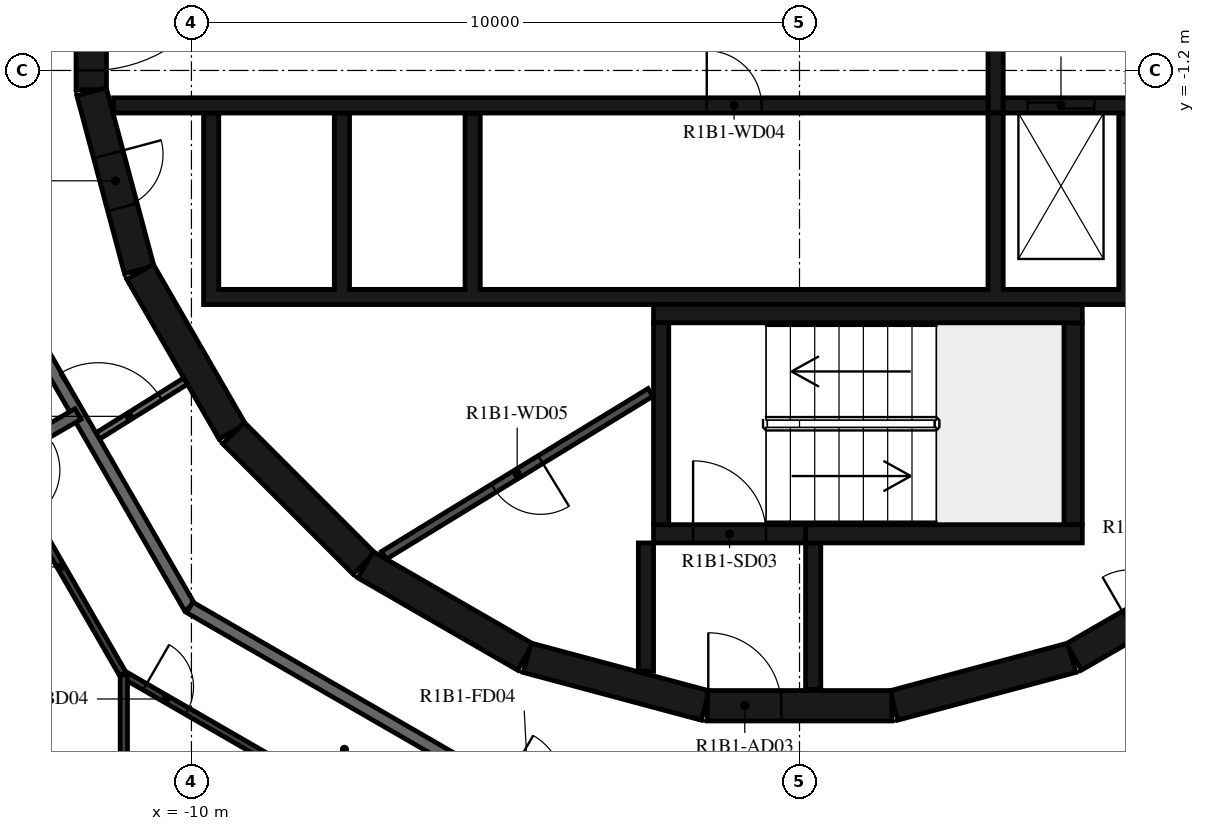
"""IFC4 building model, lengths in metres.
Left out: names, types, materials, properties, quantities, classifications, styles, units other than length and angle.
Written with IfcOpenShell. Run it as: python <this file> out.ifc"""

import sys

from ifc_helpers import new_model, si_unit, direction, frame, frame_2d, origin, place, context, subcontext, project, spatial, polyline, rectangle, outline, extrude, element, fill, save


model = new_model("IFC4")
c1 = context("Model", 3, precision=1e-05, world=origin(), true_north=direction((0.0, 1.0)))
c2 = subcontext(c1, "Body", "Model", "MODEL_VIEW")
j1 = project(units=[si_unit("LENGTHUNIT", "METRE"), si_unit("PLANEANGLEUNIT", "RADIAN")], contexts=[c1])
p1 = place(None, origin())
s1 = spatial("IfcSite", under=j1, at=p1, CompositionType="ELEMENT")
p2 = place(p1, origin())
s2 = spatial("IfcBuilding", under=s1, at=p2, CompositionType="ELEMENT")
p3 = place(p2, frame((0.0, 0.0, 48.9)))
s3 = spatial("IfcBuildingStorey", under=s2, at=p3, CompositionType="ELEMENT", Elevation=48.9)
p4 = place(p3, frame((1.55, -11.643, 0.0), z_axis=(0.0, 0.0, 1.0), x_axis=(0.965948410781, 0.258734743916, 0.0)))
e1 = element("IfcWall", 1, at=p4, inside=s3, PredefinedType="SHEAR", context=c2, shape_type="SweptSolid", body=[
    extrude(rectangle(XDim=3.033, YDim=0.5, at=frame_2d((1.516, 0.0))), origin(), (0.0, 0.0, 1.0), 3.12),
])
p5 = place(p3, frame((4.51, -10.845, 0.0), z_axis=(0.0, 0.0, 1.0), x_axis=(0.865975092491, 0.500087131594, 0.0)))
e2 = element("IfcWall", 2, at=p5, inside=s3, PredefinedType="SHEAR", context=c2, shape_type="SweptSolid", body=[
    extrude(rectangle(XDim=3.033, YDim=0.5, at=frame_2d((1.516, 0.0))), origin(), (0.0, 0.0, 1.0), 3.12),
])
p6 = place(p5, frame((1.066, 0.0, 0.0)))
e3 = element("IfcOpeningElement", 3, at=p6, cuts=e2, PredefinedType="OPENING", context=c2, shape_type="SweptSolid", body=[
    extrude(rectangle(XDim=0.9, YDim=2.1, at=frame_2d((0.45, 1.05))), frame((0.0, 0.26, 0.0), z_axis=(0.0, -1.0, 0.0), x_axis=(1.0, 0.0, 0.0)), (0.0, 0.0, 1.0), 0.52),
])
p7 = place(p3, frame((-11.647, 1.516, 0.0), z_axis=(0.0, 0.0, 1.0), x_axis=(0.0, -1.0, 0.0)))
e4 = element("IfcWall", 4, at=p7, inside=s3, PredefinedType="SHEAR", context=c2, shape_type="SweptSolid", body=[
    extrude(rectangle(XDim=3.033, YDim=0.5, at=frame_2d((1.516, 0.0))), origin(), (0.0, 0.0, 1.0), 3.12),
])
p8 = place(p7, frame((0.316, 0.0, 0.0)))
e5 = element("IfcOpeningElement", 5, at=p8, cuts=e4, PredefinedType="OPENING", context=c2, shape_type="SweptSolid", body=[
    extrude(rectangle(XDim=2.4, YDim=2.1, at=frame_2d((1.2, 1.05))), frame((0.0, 0.26, 0.0), z_axis=(0.0, -1.0, 0.0), x_axis=(1.0, 0.0, 0.0)), (0.0, 0.0, 1.0), 0.52),
])
p9 = place(p3, frame((-11.643, -1.55, 0.0), z_axis=(0.0, 0.0, 1.0), x_axis=(0.258734743916, -0.965948410781, 0.0)))
e6 = element("IfcWall", 6, at=p9, inside=s3, PredefinedType="SHEAR", context=c2, shape_type="SweptSolid", body=[
    extrude(rectangle(XDim=3.033, YDim=0.5, at=frame_2d((1.516, 0.0))), origin(), (0.0, 0.0, 1.0), 3.12),
])
p10 = place(p9, frame((1.066, 0.0, 0.0)))
e7 = element("IfcOpeningElement", 7, at=p10, cuts=e6, PredefinedType="OPENING", context=c2, shape_type="SweptSolid", body=[
    extrude(rectangle(XDim=0.9, YDim=2.1, at=frame_2d((0.45, 1.05))), frame((0.0, 0.26, 0.0), z_axis=(0.0, -1.0, 0.0), x_axis=(1.0, 0.0, 0.0)), (0.0, 0.0, 1.0), 0.52),
])
p11 = place(p3, frame((-10.845, -4.51, 0.0), z_axis=(0.0, 0.0, 1.0), x_axis=(0.500087131594, -0.865975092491, 0.0)))
e8 = element("IfcWall", 8, at=p11, inside=s3, PredefinedType="SHEAR", context=c2, shape_type="SweptSolid", body=[
    extrude(rectangle(XDim=3.033, YDim=0.5, at=frame_2d((1.516, 0.0))), origin(), (0.0, 0.0, 1.0), 3.12),
])
p12 = place(p3, frame((-9.308, -7.164, 0.0), z_axis=(0.0, 0.0, 1.0), x_axis=(0.707106781187, -0.707106781187, 0.0)))
e9 = element("IfcWall", 9, at=p12, inside=s3, PredefinedType="SHEAR", context=c2, shape_type="SweptSolid", body=[
    extrude(rectangle(XDim=3.032, YDim=0.5, at=frame_2d((1.516, 0.0))), origin(), (0.0, 0.0, 1.0), 3.12),
])
for number, where, z_axis, x_axis in (
    (10, (-7.137, -9.329, 0.0), (0.0, 0.0, 1.0), (0.866, -0.5, 0.0)),
    (11, (-4.479, -10.858, 0.0), (0.0, 0.0, 1.0), (0.966, -0.259, 0.0)),
):
    element("IfcWall", number, at=place(p3, frame(where, z_axis=z_axis, x_axis=x_axis)), inside=s3, PredefinedType="SHEAR", context=c2, shape_type="SweptSolid", body=[
        extrude(rectangle(XDim=3.033, YDim=0.5, at=frame_2d((1.516, 0.0))), origin(), (0.0, 0.0, 1.0), 3.12),
    ])
p13 = place(p3, frame((-1.516, -11.647, 0.0), z_axis=(0.0, 0.0, 1.0), x_axis=(1.0, 0.0, 0.0)))
e12 = element("IfcWall", 12, at=p13, inside=s3, PredefinedType="SHEAR", context=c2, shape_type="SweptSolid", body=[
    extrude(rectangle(XDim=3.033, YDim=0.5, at=frame_2d((1.516, 0.0))), origin(), (0.0, 0.0, 1.0), 3.12),
])
p14 = place(p13, frame((0.016, 0.0, 0.0)))
e13 = element("IfcOpeningElement", 13, at=p14, cuts=e12, PredefinedType="OPENING", context=c2, shape_type="SweptSolid", body=[
    extrude(rectangle(XDim=1.2, YDim=2.1, at=frame_2d((0.6, 1.05))), frame((0.0, 0.26, 0.0), z_axis=(0.0, -1.0, 0.0), x_axis=(1.0, 0.0, 0.0)), (0.0, 0.0, 1.0), 0.52),
])
p15 = place(p3, frame((-2.275, -8.67, 0.0), z_axis=(0.0, 0.0, 1.0), x_axis=(0.0, 1.0, 0.0)))
e14 = element("IfcWall", 14, at=p15, inside=s3, PredefinedType="SHEAR", context=c2, shape_type="SweptSolid", body=[
    extrude(rectangle(XDim=3.32, YDim=0.25, at=frame_2d((1.66, 0.0))), origin(), (0.0, 0.0, 1.0), 3.12),
])
p16 = place(p3, frame((-2.4, -5.2, 0.0), z_axis=(0.0, 0.0, 1.0), x_axis=(1.0, 0.0, 0.0)))
e15 = element("IfcWall", 15, at=p16, inside=s3, PredefinedType="SHEAR", context=c2, shape_type="SweptSolid", body=[
    extrude(rectangle(XDim=7.05, YDim=0.3, at=frame_2d((3.525, 0.0))), origin(), (0.0, 0.0, 1.0), 3.12),
])
p17 = place(p3, frame((4.5, -8.67, 0.0), z_axis=(0.0, 0.0, 1.0), x_axis=(0.0, 1.0, 0.0)))
e16 = element("IfcWall", 16, at=p17, inside=s3, PredefinedType="SHEAR", context=c2, shape_type="SweptSolid", body=[
    extrude(rectangle(XDim=3.32, YDim=0.3, at=frame_2d((1.66, 0.0))), origin(), (0.0, 0.0, 1.0), 3.12),
])
p18 = place(p3, frame((0.1, -8.82, 0.0), z_axis=(0.0, 0.0, 1.0), x_axis=(1.0, 0.0, 0.0)))
e17 = element("IfcWall", 17, at=p18, inside=s3, PredefinedType="SHEAR", context=c2, shape_type="SweptSolid", body=[
    extrude(rectangle(XDim=4.55, YDim=0.3, at=frame_2d((2.275, 0.0))), origin(), (0.0, 0.0, 1.0), 3.12),
])
p19 = place(p3, frame((-2.4, -8.82, 0.0), z_axis=(0.0, 0.0, 1.0), x_axis=(1.0, 0.0, 0.0)))
e18 = element("IfcWall", 18, at=p19, inside=s3, PredefinedType="SHEAR", context=c2, shape_type="SweptSolid", body=[
    extrude(rectangle(XDim=2.5, YDim=0.3, at=frame_2d((1.25, 0.0))), origin(), (0.0, 0.0, 1.0), 3.12),
])
p20 = place(p19, frame((0.65, 0.0, 0.0)))
e19 = element("IfcOpeningElement", 19, at=p20, cuts=e18, PredefinedType="OPENING", context=c2, shape_type="SweptSolid", body=[
    extrude(rectangle(XDim=1.2, YDim=2.1, at=frame_2d((0.6, 1.05))), frame((0.0, 0.16, 0.0), z_axis=(0.0, -1.0, 0.0), x_axis=(1.0, 0.0, 0.0)), (0.0, 0.0, 1.0), 0.32),
])
p21 = place(p3, frame((-2.525, -8.97, 0.0), z_axis=(0.0, 0.0, 1.0), x_axis=(0.0, -1.0, 0.0)))
e20 = element("IfcWall", 20, at=p21, inside=s3, PredefinedType="SHEAR", context=c2, shape_type="SweptSolid", body=[
    extrude(rectangle(XDim=2.11, YDim=0.25, at=frame_2d((1.055, 0.0))), origin(), (0.0, 0.0, 1.0), 3.12),
])
p22 = place(p3, frame((0.225, -8.97, 0.0), z_axis=(0.0, 0.0, 1.0), x_axis=(0.0, -1.0, 0.0)))
e21 = element("IfcWall", 21, at=p22, inside=s3, PredefinedType="SHEAR", context=c2, shape_type="SweptSolid", body=[
    extrude(rectangle(XDim=2.41, YDim=0.25, at=frame_2d((1.205, 0.0))), origin(), (0.0, 0.0, 1.0), 3.12),
])
p23 = place(p3, origin())
e22 = element("IfcWall", 22, at=p23, inside=s3, PredefinedType="SHEAR", context=c2, shape_type="SweptSolid", body=[
    extrude(outline(polyline([(9.8, -5.05), (9.8, -4.8), (9.8, -1.9), (9.55, -1.9), (9.55, -4.8), (7.65, -4.8), (7.65, -1.9), (7.4, -1.9), (7.4, -4.8), (5.5, -4.8), (5.5, -1.9), (5.25, -1.9), (5.25, -4.8), (3.35, -4.8), (3.35, -1.9), (3.1, -1.9), (3.1, -4.8), (-5.25, -4.8), (-5.25, -1.9), (-5.5, -1.9), (-5.5, -4.8), (-7.4, -4.8), (-7.4, -1.9), (-7.65, -1.9), (-7.65, -4.8), (-9.55, -4.8), (-9.55, -1.9), (-9.8, -1.9), (-9.8, -4.8), (-9.8, -5.05), (9.8, -5.05)])), origin(), (0.0, 0.0, 1.0), 3.12),
])
p24 = place(p3, frame((-11.28, -1.775, 0.0), z_axis=(0.0, 0.0, 1.0), x_axis=(1.0, 0.0, 0.0)))
e23 = element("IfcWall", 23, at=p24, inside=s3, PredefinedType="SHEAR", context=c2, shape_type="SweptSolid", body=[
    extrude(rectangle(XDim=14.38, YDim=0.25, at=frame_2d((7.19, 0.0))), origin(), (0.0, 0.0, 1.0), 3.12),
])
p25 = place(p24, frame((9.755, 0.0, 0.0)))
e24 = element("IfcOpeningElement", 24, at=p25, cuts=e23, PredefinedType="OPENING", context=c2, shape_type="SweptSolid", body=[
    extrude(rectangle(XDim=0.9, YDim=2.1, at=frame_2d((0.45, 1.05))), frame((0.0, 0.135, 0.0), z_axis=(0.0, -1.0, 0.0), x_axis=(1.0, 0.0, 0.0)), (0.0, 0.0, 1.0), 0.27),
])
p26 = place(p3, frame((3.35, -1.775, 0.0), z_axis=(0.0, 0.0, 1.0), x_axis=(1.0, 0.0, 0.0)))
e25 = element("IfcWall", 25, at=p26, inside=s3, PredefinedType="SHEAR", context=c2, shape_type="SweptSolid", body=[
    extrude(rectangle(XDim=7.93, YDim=0.25, at=frame_2d((3.965, 0.0))), origin(), (0.0, 0.0, 1.0), 3.12),
])
p27 = place(p26, frame((0.4, 0.0, 0.0)))
e26 = element("IfcOpeningElement", 26, at=p27, cuts=e25, PredefinedType="OPENING", context=c2, shape_type="SweptSolid", body=[
    extrude(rectangle(XDim=1.1, YDim=2.4, at=frame_2d((0.55, 1.2))), frame((0.0, 0.135, 0.0), z_axis=(0.0, -1.0, 0.0), x_axis=(1.0, 0.0, 0.0)), (0.0, 0.0, 1.0), 0.27),
])
p28 = place(p26, frame((2.55, 0.0, 0.0)))
e27 = element("IfcOpeningElement", 27, at=p28, cuts=e25, PredefinedType="OPENING", context=c2, shape_type="SweptSolid", body=[
    extrude(rectangle(XDim=1.1, YDim=2.4, at=frame_2d((0.55, 1.2))), frame((0.0, 0.135, 0.0), z_axis=(0.0, -1.0, 0.0), x_axis=(1.0, 0.0, 0.0)), (0.0, 0.0, 1.0), 0.27),
])
p29 = place(p26, frame((4.7, 0.0, 0.0)))
e28 = element("IfcOpeningElement", 28, at=p29, cuts=e25, PredefinedType="OPENING", context=c2, shape_type="SweptSolid", body=[
    extrude(rectangle(XDim=1.1, YDim=2.4, at=frame_2d((0.55, 1.2))), frame((0.0, 0.135, 0.0), z_axis=(0.0, -1.0, 0.0), x_axis=(1.0, 0.0, 0.0)), (0.0, 0.0, 1.0), 0.27),
])
p30 = place(p3, frame((3.225, -1.9, 0.0), z_axis=(0.0, 0.0, 1.0), x_axis=(0.0, 1.0, 0.0)))
e29 = element("IfcWall", 29, at=p30, inside=s3, PredefinedType="SHEAR", context=c2, shape_type="SweptSolid", body=[
    extrude(rectangle(XDim=3.8, YDim=0.25, at=frame_2d((1.9, 0.0))), origin(), (0.0, 0.0, 1.0), 3.12),
])
p31 = place(p3, frame((-2.451, -6.495, 0.0), z_axis=(0.0, 0.0, 1.0), x_axis=(-0.853250115418, -0.521501908471, 0.0)))
e30 = element("IfcWall", 30, at=p31, inside=s3, PredefinedType="PARTITIONING", context=c2, shape_type="SweptSolid", body=[
    extrude(rectangle(XDim=5.137, YDim=0.15, at=frame_2d((2.569, 0.0))), origin(), (0.0, 0.0, 1.0), 3.12),
])
p32 = place(p31, frame((2.119, 0.0, 0.0)))
e31 = element("IfcOpeningElement", 31, at=p32, cuts=e30, PredefinedType="OPENING", context=c2, shape_type="SweptSolid", body=[
    extrude(rectangle(XDim=0.9, YDim=2.1, at=frame_2d((0.45, 1.05))), frame((0.0, 0.085, 0.0), z_axis=(0.0, -1.0, 0.0), x_axis=(1.0, 0.0, 0.0)), (0.0, 0.0, 1.0), 0.17),
])
p33 = place(p3, frame((-11.625, -7.264, 0.0), z_axis=(0.0, 0.0, 1.0), x_axis=(0.84803632456, 0.529938102259, 0.0)))
e32 = element("IfcWall", 32, at=p33, inside=s3, PredefinedType="PARTITIONING", context=c2, shape_type="SweptSolid", body=[
    extrude(rectangle(XDim=1.804, YDim=0.12, at=frame_2d((0.902, 0.0))), origin(), (0.0, 0.0, 1.0), 3.12),
])
p34 = place(p33, frame((0.11, 0.0, 0.0)))
e33 = element("IfcOpeningElement", 33, at=p34, cuts=e32, PredefinedType="OPENING", context=c2, shape_type="SweptSolid", body=[
    extrude(rectangle(XDim=1.2, YDim=2.1, at=frame_2d((0.6, 1.05))), frame((0.0, 0.07, 0.0), z_axis=(0.0, -1.0, 0.0), x_axis=(1.0, 0.0, 0.0)), (0.0, 0.0, 1.0), 0.14),
])
p35 = place(p3, frame((-13.7, -3.671, 0.0), z_axis=(0.0, 0.0, 1.0), x_axis=(0.500001669485, -0.866024439905, 0.0)))
e34 = element("IfcWall", 34, at=p35, inside=s3, PredefinedType="STANDARD", context=c2, shape_type="SweptSolid", body=[
    extrude(rectangle(XDim=7.342, YDim=0.2, at=frame_2d((3.671, 0.0))), origin(), (0.0, 0.0, 1.0), 3.12),
])
p36 = place(p3, frame((-10.029, -10.029, 0.0), z_axis=(0.0, 0.0, 1.0), x_axis=(0.866022878987, -0.500004373052, 0.0)))
e35 = element("IfcWall", 35, at=p36, inside=s3, PredefinedType="STANDARD", context=c2, shape_type="SweptSolid", body=[
    extrude(rectangle(XDim=7.146, YDim=0.2, at=frame_2d((3.573, 0.0))), origin(), (0.0, 0.0, 1.0), 3.12),
])
p37 = place(p36, frame((5.947, 0.0, 0.0)))
e36 = element("IfcOpeningElement", 36, at=p37, cuts=e35, PredefinedType="OPENING", context=c2, shape_type="SweptSolid", body=[
    extrude(rectangle(XDim=1.0, YDim=2.1, at=frame_2d((0.5, 1.05))), frame((0.0, 0.11, 0.0), z_axis=(0.0, -1.0, 0.0), x_axis=(1.0, 0.0, 0.0)), (0.0, 0.0, 1.0), 0.22),
])
p38 = place(p3, frame((3.671, -13.7, 0.0), z_axis=(0.0, 0.0, 1.0), x_axis=(0.866024439905, 0.500001669485, 0.0)))
e37 = element("IfcWall", 37, at=p38, inside=s3, PredefinedType="STANDARD", context=c2, shape_type="SweptSolid", body=[
    extrude(rectangle(XDim=7.342, YDim=0.2, at=frame_2d((3.671, 0.0))), origin(), (0.0, 0.0, 1.0), 3.12),
])
p39 = place(p3, frame((-16.817, -9.709, 0.0), z_axis=(0.0, 0.0, 1.0), x_axis=(0.86604338933, 0.499968846828, 0.0)))
e38 = element("IfcWall", 38, at=p39, inside=s3, PredefinedType="STANDARD", context=c2, shape_type="SweptSolid", body=[
    extrude(rectangle(XDim=5.718, YDim=0.2, at=frame_2d((2.859, 0.0))), origin(), (0.0, 0.0, 1.0), 3.12),
])
p40 = place(p3, frame((-13.164, -7.6, 0.0), z_axis=(0.0, 0.0, 1.0), x_axis=(0.500000928893, -0.866024867487, 0.0)))
e39 = element("IfcWall", 39, at=p40, inside=s3, PredefinedType="PARTITIONING", context=c2, shape_type="SweptSolid", body=[
    extrude(rectangle(XDim=4.073, YDim=0.12, at=frame_2d((2.036, 0.0))), origin(), (0.0, 0.0, 1.0), 3.12),
])
p41 = place(p40, frame((0.2, 0.0, 0.0)))
e40 = element("IfcOpeningElement", 40, at=p41, cuts=e39, PredefinedType="OPENING", context=c2, shape_type="SweptSolid", body=[
    extrude(rectangle(XDim=0.9, YDim=2.1, at=frame_2d((0.45, 1.05))), frame((0.0, 0.07, 0.0), z_axis=(0.0, -1.0, 0.0), x_axis=(1.0, 0.0, 0.0)), (0.0, 0.0, 1.0), 0.14),
])
p42 = place(p3, frame((-11.112, -11.136, 0.0), z_axis=(0.0, 0.0, 1.0), x_axis=(0.866017718408, -0.500013311227, 0.0)))
e41 = element("IfcWall", 41, at=p42, inside=s3, PredefinedType="PARTITIONING", context=c2, shape_type="SweptSolid", body=[
    extrude(rectangle(XDim=6.588, YDim=0.12, at=frame_2d((3.294, 0.0))), origin(), (0.0, 0.0, 1.0), 3.12),
])
p43 = place(p42, frame((0.4, 0.0, 0.0)))
e42 = element("IfcOpeningElement", 42, at=p43, cuts=e41, PredefinedType="OPENING", context=c2, shape_type="SweptSolid", body=[
    extrude(rectangle(XDim=0.8, YDim=2.1, at=frame_2d((0.4, 1.05))), frame((0.0, 0.07, 0.0), z_axis=(0.0, -1.0, 0.0), x_axis=(1.0, 0.0, 0.0)), (0.0, 0.0, 1.0), 0.14),
])
p44 = place(p3, frame((-11.112, -14.43, 0.0), z_axis=(0.0, 0.0, 1.0), x_axis=(0.0, 1.0, 0.0)))
e43 = element("IfcWall", 43, at=p44, inside=s3, PredefinedType="PARTITIONING", context=c2, shape_type="SweptSolid", body=[
    extrude(rectangle(XDim=3.294, YDim=0.12, at=frame_2d((1.647, 0.0))), origin(), (0.0, 0.0, 1.0), 3.12),
])
p45 = place(p3, frame((4.613, -14.888, 0.0), z_axis=(0.0, 0.0, 1.0), x_axis=(0.866025608725, 0.499999645032, 0.0)))
e44 = element("IfcWall", 44, at=p45, inside=s3, PredefinedType="PARTITIONING", context=c2, shape_type="SweptSolid", body=[
    extrude(rectangle(XDim=7.522, YDim=0.12, at=frame_2d((3.761, 0.0))), origin(), (0.0, 0.0, 1.0), 3.12),
])
p46 = place(p45, frame((4.017, 0.0, 0.0)))
e45 = element("IfcOpeningElement", 45, at=p46, cuts=e44, PredefinedType="OPENING", context=c2, shape_type="SweptSolid", body=[
    extrude(rectangle(XDim=0.8, YDim=2.1, at=frame_2d((0.4, 1.05))), frame((0.0, 0.07, 0.0), z_axis=(0.0, -1.0, 0.0), x_axis=(1.0, 0.0, 0.0)), (0.0, 0.0, 1.0), 0.14),
])
p47 = place(p20, origin())
e46 = element("IfcDoor", 46, at=p47, inside=s3, OperationType="SINGLE_SWING_LEFT", PredefinedType="DOOR", context=c2, shape_type="SweptSolid", body=[
    extrude(rectangle(XDim=1.2, YDim=2.1, at=frame_2d((0.6, 1.05))), frame((0.0, 0.025, 0.0), z_axis=(0.0, -1.0, 0.0), x_axis=(1.0, 0.0, 0.0)), (0.0, 0.0, 1.0), 0.05),
])
fill(e19, e46)
p48 = place(p14, origin())
e47 = element("IfcDoor", 47, at=p48, inside=s3, OperationType="SINGLE_SWING_RIGHT", PredefinedType="DOOR", context=c2, shape_type="SweptSolid", body=[
    extrude(rectangle(XDim=1.2, YDim=2.1, at=frame_2d((0.6, 1.05))), frame((0.0, 0.025, 0.0), z_axis=(0.0, -1.0, 0.0), x_axis=(1.0, 0.0, 0.0)), (0.0, 0.0, 1.0), 0.05),
])
fill(e13, e47)
p49 = place(p8, origin())
e48 = element("IfcDoor", 48, at=p49, inside=s3, OperationType="DOUBLE_DOOR_SINGLE_SWING", PredefinedType="DOOR", context=c2, shape_type="SweptSolid", body=[
    extrude(rectangle(XDim=2.4, YDim=2.1, at=frame_2d((1.2, 1.05))), frame((0.0, 0.025, 0.0), z_axis=(0.0, -1.0, 0.0), x_axis=(1.0, 0.0, 0.0)), (0.0, 0.0, 1.0), 0.05),
])
fill(e5, e48)
p50 = place(p27, origin())
e49 = element("IfcDoor", 49, at=p50, inside=s3, OperationType="DOUBLE_DOOR_SLIDING", PredefinedType="DOOR", context=c2, shape_type="SweptSolid", body=[
    extrude(rectangle(XDim=1.1, YDim=2.4, at=frame_2d((0.55, 1.2))), frame((0.0, 0.025, 0.0), z_axis=(0.0, -1.0, 0.0), x_axis=(1.0, 0.0, 0.0)), (0.0, 0.0, 1.0), 0.05),
])
fill(e26, e49)
p51 = place(p25, origin())
e50 = element("IfcDoor", 50, at=p51, inside=s3, OperationType="SINGLE_SWING_LEFT", PredefinedType="DOOR", context=c2, shape_type="SweptSolid", body=[
    extrude(rectangle(XDim=0.9, YDim=2.1, at=frame_2d((0.45, 1.05))), frame((0.0, 0.025, 0.0), z_axis=(0.0, -1.0, 0.0), x_axis=(1.0, 0.0, 0.0)), (0.0, 0.0, 1.0), 0.05),
])
fill(e24, e50)
p52 = place(p32, origin())
e51 = element("IfcDoor", 51, at=p52, inside=s3, OperationType="SINGLE_SWING_RIGHT", PredefinedType="DOOR", context=c2, shape_type="SweptSolid", body=[
    extrude(rectangle(XDim=0.9, YDim=2.1, at=frame_2d((0.45, 1.05))), frame((0.0, 0.025, 0.0), z_axis=(0.0, -1.0, 0.0), x_axis=(1.0, 0.0, 0.0)), (0.0, 0.0, 1.0), 0.05),
])
fill(e31, e51)
p53 = place(p10, origin())
e52 = element("IfcDoor", 52, at=p53, inside=s3, OperationType="SINGLE_SWING_RIGHT", PredefinedType="DOOR", context=c2, shape_type="SweptSolid", body=[
    extrude(rectangle(XDim=0.9, YDim=2.1, at=frame_2d((0.45, 1.05))), frame((0.0, 0.025, 0.0), z_axis=(0.0, -1.0, 0.0), x_axis=(1.0, 0.0, 0.0)), (0.0, 0.0, 1.0), 0.05),
])
fill(e7, e52)
p54 = place(p43, origin())
e53 = element("IfcDoor", 53, at=p54, inside=s3, OperationType="SINGLE_SWING_LEFT", PredefinedType="DOOR", context=c2, shape_type="SweptSolid", body=[
    extrude(rectangle(XDim=0.8, YDim=2.1, at=frame_2d((0.4, 1.05))), frame((0.0, 0.025, 0.0), z_axis=(0.0, -1.0, 0.0), x_axis=(1.0, 0.0, 0.0)), (0.0, 0.0, 1.0), 0.05),
])
fill(e42, e53)
p55 = place(p34, origin())
e54 = element("IfcDoor", 54, at=p55, inside=s3, OperationType="DOUBLE_DOOR_SINGLE_SWING", PredefinedType="DOOR", context=c2, shape_type="SweptSolid", body=[
    extrude(rectangle(XDim=1.2, YDim=2.1, at=frame_2d((0.6, 1.05))), frame((0.0, 0.025, 0.0), z_axis=(0.0, -1.0, 0.0), x_axis=(1.0, 0.0, 0.0)), (0.0, 0.0, 1.0), 0.05),
])
fill(e33, e54)
save(model, sys.argv[1])
